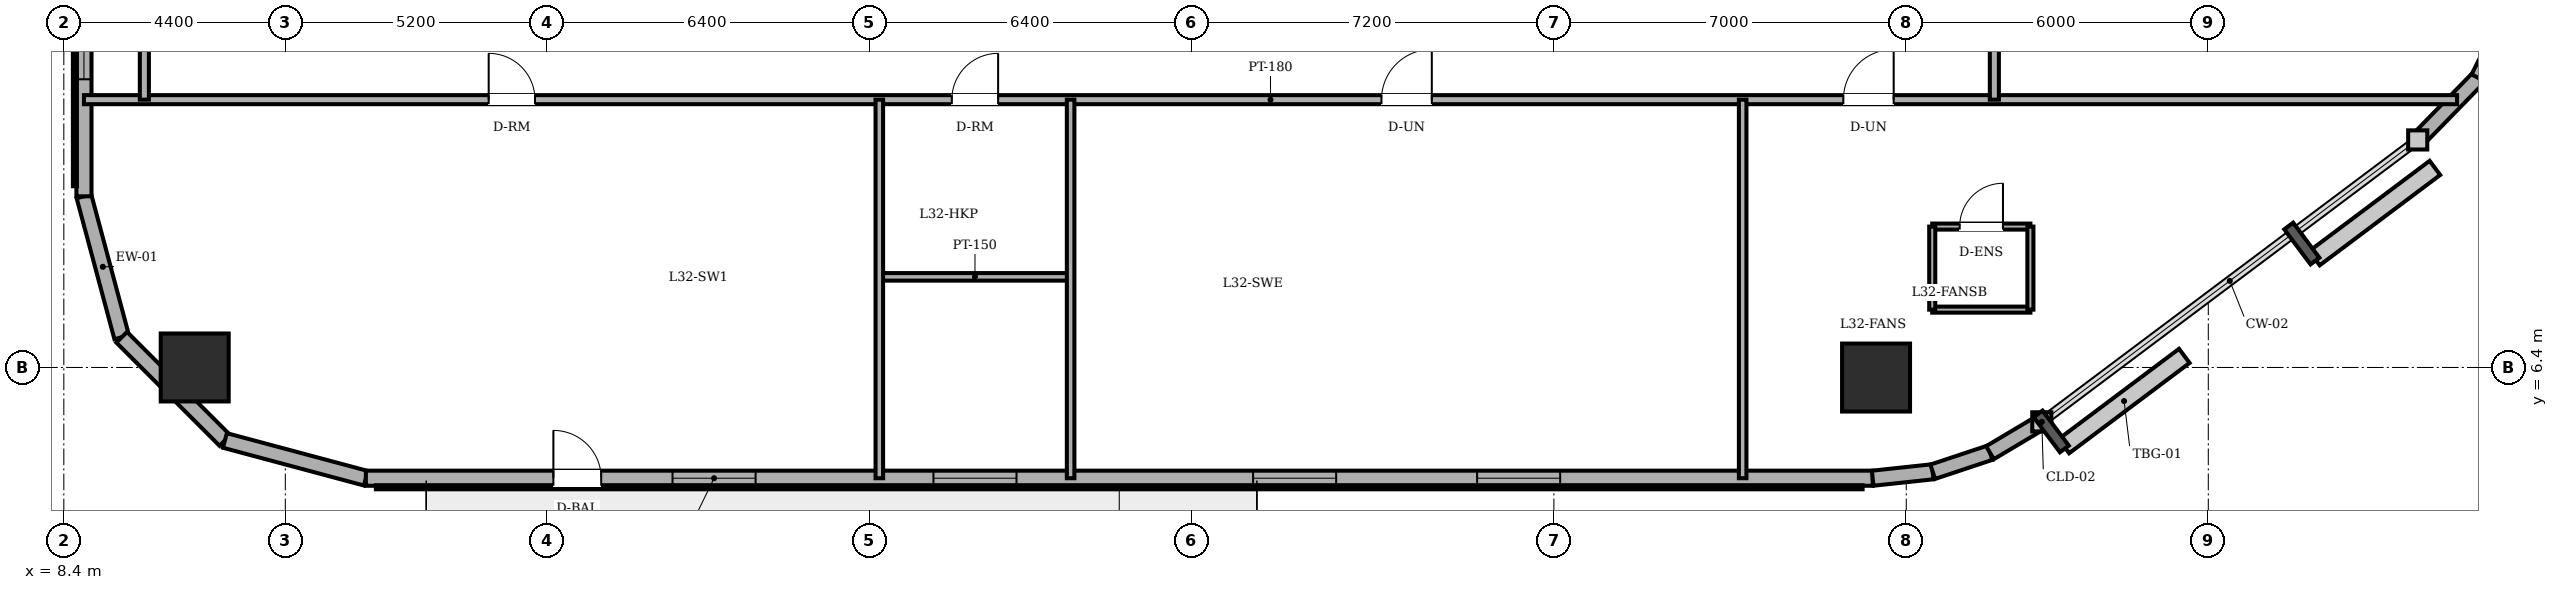
"""IFC4 building model, lengths in metres.
Left out: names, types, materials, properties, quantities, classifications, styles, units other than length and angle.
Written with IfcOpenShell. Run it as: python <this file> out.ifc"""

import sys

from ifc_helpers import new_model, si_unit, direction, frame, frame_2d, origin, origin_2d, place, context, subcontext, project, spatial, rectangle, circle, extrude, element, fill, save


model = new_model("IFC4")
c1 = context("Model", 3, precision=1e-05, world=origin(), true_north=direction((0.0, 1.0)))
c2 = subcontext(c1, "Body", "Model", "MODEL_VIEW")
j1 = project(units=[si_unit("LENGTHUNIT", "METRE"), si_unit("PLANEANGLEUNIT", "RADIAN")], contexts=[c1])
p1 = place(None, origin())
s1 = spatial("IfcSite", under=j1, at=p1, CompositionType="ELEMENT")
p2 = place(p1, origin())
s2 = spatial("IfcBuilding", under=s1, at=p2, CompositionType="ELEMENT")
p3 = place(p2, frame((0.0, 0.0, 122.3)))
s3 = spatial("IfcBuildingStorey", under=s2, at=p3, CompositionType="ELEMENT", Elevation=122.3)
for number, where, z_axis, x_axis in (
    (1, (11.0, 6.4, 0.0), (0.0, 0.0, 1.0), (1.0, 0.0, 0.0)),
    (2, (44.4, 6.2, 0.0), (0.0, 0.0, 1.0), (1.0, 0.0, 0.0)),
):
    element("IfcColumn", number, at=place(p3, frame(where, z_axis=z_axis, x_axis=x_axis)), inside=s3, PredefinedType="COLUMN", context=c2, shape_type="SweptSolid", body=[
        extrude(circle(Radius=0.675, at=origin_2d()), origin(), (0.0, 0.0, 1.0), 3.6),
    ])
p4 = place(p3, frame((8.8, 9.8, 0.0), z_axis=(0.0, 0.0, 1.0), x_axis=(0.258731875344, -0.96594917914, 0.0)))
e3 = element("IfcWall", 3, at=p4, inside=s3, PredefinedType="SOLIDWALL", context=c2, shape_type="SweptSolid", body=[
    extrude(rectangle(XDim=2.899, YDim=0.3, at=frame_2d((1.449, 0.0))), origin(), (0.0, 0.0, 1.0), 3.4),
])
p5 = place(p3, frame((9.55, 7.0, 0.0), z_axis=(0.0, 0.0, 1.0), x_axis=(0.707106781187, -0.707106781187, 0.0)))
e4 = element("IfcWall", 4, at=p5, inside=s3, PredefinedType="SOLIDWALL", context=c2, shape_type="SweptSolid", body=[
    extrude(rectangle(XDim=2.899, YDim=0.3, at=frame_2d((1.45, 0.0))), origin(), (0.0, 0.0, 1.0), 3.4),
])
p6 = place(p3, frame((11.6, 4.95, 0.0), z_axis=(0.0, 0.0, 1.0), x_axis=(0.965943540406, -0.258752926066, 0.0)))
e5 = element("IfcWall", 5, at=p6, inside=s3, PredefinedType="SOLIDWALL", context=c2, shape_type="SweptSolid", body=[
    extrude(rectangle(XDim=2.898, YDim=0.3, at=frame_2d((1.449, 0.0))), origin(), (0.0, 0.0, 1.0), 3.4),
])
p7 = place(p3, frame((14.4, 4.2, 0.0), z_axis=(0.0, 0.0, 1.0), x_axis=(1.0, 0.0, 0.0)))
e6 = element("IfcWall", 6, at=p7, inside=s3, PredefinedType="SOLIDWALL", context=c2, shape_type="SweptSolid", body=[
    extrude(rectangle(XDim=29.933, YDim=0.3, at=frame_2d((14.967, 0.0))), origin(), (0.0, 0.0, 1.0), 3.4),
])
p8 = place(p7, frame((3.725, 0.0, 0.0)))
e7 = element("IfcOpeningElement", 7, at=p8, cuts=e6, PredefinedType="OPENING", context=c2, shape_type="SweptSolid", body=[
    extrude(rectangle(XDim=0.95, YDim=2.2, at=frame_2d((0.475, 1.1))), frame((0.0, 0.16, 0.0), z_axis=(0.0, -1.0, 0.0), x_axis=(1.0, 0.0, 0.0)), (0.0, 0.0, 1.0), 0.32),
])
p9 = place(p7, frame((6.092, 0.0, 0.85)))
e8 = element("IfcOpeningElement", 8, at=p9, cuts=e6, PredefinedType="OPENING", context=c2, shape_type="SweptSolid", body=[
    extrude(rectangle(XDim=1.65, YDim=1.55, at=frame_2d((0.825, 0.775))), frame((0.0, 0.16, 0.0), z_axis=(0.0, -1.0, 0.0), x_axis=(1.0, 0.0, 0.0)), (0.0, 0.0, 1.0), 0.32),
])
p10 = place(p7, frame((11.275, 0.0, 0.85)))
e9 = element("IfcOpeningElement", 9, at=p10, cuts=e6, PredefinedType="OPENING", context=c2, shape_type="SweptSolid", body=[
    extrude(rectangle(XDim=1.65, YDim=1.55, at=frame_2d((0.825, 0.775))), frame((0.0, 0.16, 0.0), z_axis=(0.0, -1.0, 0.0), x_axis=(1.0, 0.0, 0.0)), (0.0, 0.0, 1.0), 0.32),
])
p11 = place(p7, frame((17.625, 0.0, 0.85)))
e10 = element("IfcOpeningElement", 10, at=p11, cuts=e6, PredefinedType="OPENING", context=c2, shape_type="SweptSolid", body=[
    extrude(rectangle(XDim=1.65, YDim=1.55, at=frame_2d((0.825, 0.775))), frame((0.0, 0.16, 0.0), z_axis=(0.0, -1.0, 0.0), x_axis=(1.0, 0.0, 0.0)), (0.0, 0.0, 1.0), 0.32),
])
p12 = place(p7, frame((22.075, 0.0, 0.85)))
e11 = element("IfcOpeningElement", 11, at=p12, cuts=e6, PredefinedType="OPENING", context=c2, shape_type="SweptSolid", body=[
    extrude(rectangle(XDim=1.65, YDim=1.55, at=frame_2d((0.825, 0.775))), frame((0.0, 0.16, 0.0), z_axis=(0.0, -1.0, 0.0), x_axis=(1.0, 0.0, 0.0)), (0.0, 0.0, 1.0), 0.32),
])
p13 = place(p3, frame((44.333, 4.2, 0.0), z_axis=(0.0, 0.0, 1.0), x_axis=(0.994289103787, 0.106720092254, 0.0)))
e12 = element("IfcWall", 12, at=p13, inside=s3, PredefinedType="SOLIDWALL", context=c2, shape_type="SweptSolid", body=[
    extrude(rectangle(XDim=1.199, YDim=0.3, at=frame_2d((0.599, 0.0))), origin(), (0.0, 0.0, 1.0), 3.4),
])
p14 = place(p3, frame((45.525, 4.328, 0.0), z_axis=(0.0, 0.0, 1.0), x_axis=(0.948744332129, 0.316044604847, 0.0)))
e13 = element("IfcWall", 13, at=p14, inside=s3, PredefinedType="SOLIDWALL", context=c2, shape_type="SweptSolid", body=[
    extrude(rectangle(XDim=1.2, YDim=0.3, at=frame_2d((0.6, 0.0))), origin(), (0.0, 0.0, 1.0), 3.4),
])
p15 = place(p3, frame((46.663, 4.707, 0.0), z_axis=(0.0, 0.0, 1.0), x_axis=(0.859320591642, 0.511437308749, 0.0)))
e14 = element("IfcWall", 14, at=p15, inside=s3, PredefinedType="SOLIDWALL", context=c2, shape_type="SweptSolid", body=[
    extrude(rectangle(XDim=1.199, YDim=0.3, at=frame_2d((0.599, 0.0))), origin(), (0.0, 0.0, 1.0), 3.4),
])
for number, where, z_axis, x_axis in (
    (15, (55.16, 10.92, 0.0), (0.0, 0.0, 1.0), (0.698, 0.716, 0.0)),
    (16, (56.364, 12.154, 0.0), (0.0, 0.0, 1.0), (0.447, 0.894, 0.0)),
):
    element("IfcWall", number, at=place(p3, frame(where, z_axis=z_axis, x_axis=x_axis)), inside=s3, PredefinedType="SOLIDWALL", context=c2, shape_type="SweptSolid", body=[
        extrude(rectangle(XDim=1.724, YDim=0.3, at=frame_2d((0.862, 0.0))), origin(), (0.0, 0.0, 1.0), 3.4),
    ])
p16 = place(p3, frame((8.8, 38.2, 0.0), z_axis=(0.0, 0.0, 1.0), x_axis=(0.0, -1.0, 0.0)))
e17 = element("IfcWall", 17, at=p16, inside=s3, PredefinedType="SOLIDWALL", context=c2, shape_type="SweptSolid", body=[
    extrude(rectangle(XDim=28.4, YDim=0.3, at=frame_2d((14.2, 0.0))), origin(), (0.0, 0.0, 1.0), 3.4),
])
p17 = place(p16, frame((2.325, 0.0, 0.85)))
e18 = element("IfcOpeningElement", 18, at=p17, cuts=e17, PredefinedType="OPENING", context=c2, shape_type="SweptSolid", body=[
    extrude(rectangle(XDim=1.65, YDim=1.55, at=frame_2d((0.825, 0.775))), frame((0.0, 0.16, 0.0), z_axis=(0.0, -1.0, 0.0), x_axis=(1.0, 0.0, 0.0)), (0.0, 0.0, 1.0), 0.32),
])
p18 = place(p16, frame((6.828, 0.0, 0.85)))
e19 = element("IfcOpeningElement", 19, at=p18, cuts=e17, PredefinedType="OPENING", context=c2, shape_type="SweptSolid", body=[
    extrude(rectangle(XDim=1.65, YDim=1.55, at=frame_2d((0.825, 0.775))), frame((0.0, 0.16, 0.0), z_axis=(0.0, -1.0, 0.0), x_axis=(1.0, 0.0, 0.0)), (0.0, 0.0, 1.0), 0.32),
])
p19 = place(p16, frame((10.102, 0.0, 0.85)))
e20 = element("IfcOpeningElement", 20, at=p19, cuts=e17, PredefinedType="OPENING", context=c2, shape_type="SweptSolid", body=[
    extrude(rectangle(XDim=1.65, YDim=1.55, at=frame_2d((0.825, 0.775))), frame((0.0, 0.16, 0.0), z_axis=(0.0, -1.0, 0.0), x_axis=(1.0, 0.0, 0.0)), (0.0, 0.0, 1.0), 0.32),
])
p20 = place(p16, frame((16.648, 0.0, 0.85)))
e21 = element("IfcOpeningElement", 21, at=p20, cuts=e17, PredefinedType="OPENING", context=c2, shape_type="SweptSolid", body=[
    extrude(rectangle(XDim=1.65, YDim=1.55, at=frame_2d((0.825, 0.775))), frame((0.0, 0.16, 0.0), z_axis=(0.0, -1.0, 0.0), x_axis=(1.0, 0.0, 0.0)), (0.0, 0.0, 1.0), 0.32),
])
p21 = place(p16, frame((19.922, 0.0, 0.85)))
e22 = element("IfcOpeningElement", 22, at=p21, cuts=e17, PredefinedType="OPENING", context=c2, shape_type="SweptSolid", body=[
    extrude(rectangle(XDim=1.65, YDim=1.55, at=frame_2d((0.825, 0.775))), frame((0.0, 0.16, 0.0), z_axis=(0.0, -1.0, 0.0), x_axis=(1.0, 0.0, 0.0)), (0.0, 0.0, 1.0), 0.32),
])
p22 = place(p16, frame((24.425, 0.0, 0.85)))
e23 = element("IfcOpeningElement", 23, at=p22, cuts=e17, PredefinedType="OPENING", context=c2, shape_type="SweptSolid", body=[
    extrude(rectangle(XDim=1.65, YDim=1.55, at=frame_2d((0.825, 0.775))), frame((0.0, 0.16, 0.0), z_axis=(0.0, -1.0, 0.0), x_axis=(1.0, 0.0, 0.0)), (0.0, 0.0, 1.0), 0.32),
])
p23 = place(p3, frame((45.516, 9.199, 0.0), z_axis=(0.0, 0.0, 1.0), x_axis=(1.0, 0.0, 0.0)))
e24 = element("IfcWall", 24, at=p23, inside=s3, PredefinedType="PARTITIONING", context=c2, shape_type="SweptSolid", body=[
    extrude(rectangle(XDim=1.95, YDim=0.12, at=frame_2d((0.975, 0.0))), origin(), (0.0, 0.0, 1.0), 3.4),
])
p24 = place(p23, frame((0.545, 0.0, 0.0)))
e25 = element("IfcOpeningElement", 25, at=p24, cuts=e24, PredefinedType="OPENING", context=c2, shape_type="SweptSolid", body=[
    extrude(rectangle(XDim=0.86, YDim=2.1, at=frame_2d((0.43, 1.05))), frame((0.0, 0.07, 0.0), z_axis=(0.0, -1.0, 0.0), x_axis=(1.0, 0.0, 0.0)), (0.0, 0.0, 1.0), 0.14),
])
p25 = place(p3, frame((47.466, 7.549, 0.0), z_axis=(0.0, 0.0, 1.0), x_axis=(-1.0, 0.0, 0.0)))
e26 = element("IfcWall", 26, at=p25, inside=s3, PredefinedType="PARTITIONING", context=c2, shape_type="SweptSolid", body=[
    extrude(rectangle(XDim=1.95, YDim=0.12, at=frame_2d((0.975, 0.0))), origin(), (0.0, 0.0, 1.0), 3.4),
])
for number, where, z_axis, x_axis in (
    (27, (45.516, 9.199, 0.0), (0.0, 0.0, 1.0), (0.0, -1.0, 0.0)),
    (28, (47.466, 7.549, 0.0), (0.0, 0.0, 1.0), (0.0, 1.0, 0.0)),
):
    element("IfcWall", number, at=place(p3, frame(where, z_axis=z_axis, x_axis=x_axis)), inside=s3, PredefinedType="PARTITIONING", context=c2, shape_type="SweptSolid", body=[
        extrude(rectangle(XDim=1.65, YDim=0.12, at=frame_2d((0.825, 0.0))), origin(), (0.0, 0.0, 1.0), 3.4),
    ])
p26 = place(p3, frame((24.6, 8.2, 0.0), z_axis=(0.0, 0.0, 1.0), x_axis=(1.0, 0.0, 0.0)))
e29 = element("IfcWall", 29, at=p26, inside=s3, PredefinedType="PARTITIONING", context=c2, shape_type="SweptSolid", body=[
    extrude(rectangle(XDim=3.8, YDim=0.15, at=frame_2d((1.9, 0.0))), origin(), (0.0, 0.0, 1.0), 3.4),
])
p27 = place(p3, frame((8.8, 11.72, 0.0), z_axis=(0.0, 0.0, 1.0), x_axis=(1.0, 0.0, 0.0)))
e30 = element("IfcWall", 30, at=p27, inside=s3, PredefinedType="PARTITIONING", context=c2, shape_type="SweptSolid", body=[
    extrude(rectangle(XDim=47.141, YDim=0.18, at=frame_2d((23.57, 0.0))), origin(), (0.0, 0.0, 1.0), 3.4),
])
p28 = place(p27, frame((17.24, 0.0, 0.0)))
e31 = element("IfcOpeningElement", 31, at=p28, cuts=e30, PredefinedType="OPENING", context=c2, shape_type="SweptSolid", body=[
    extrude(rectangle(XDim=0.92, YDim=2.1, at=frame_2d((0.46, 1.05))), frame((0.0, 0.1, 0.0), z_axis=(0.0, -1.0, 0.0), x_axis=(1.0, 0.0, 0.0)), (0.0, 0.0, 1.0), 0.2),
])
p29 = place(p27, frame((34.95, 0.0, 0.0)))
e32 = element("IfcOpeningElement", 32, at=p29, cuts=e30, PredefinedType="OPENING", context=c2, shape_type="SweptSolid", body=[
    extrude(rectangle(XDim=1.0, YDim=2.15, at=frame_2d((0.5, 1.075))), frame((0.0, 0.1, 0.0), z_axis=(0.0, -1.0, 0.0), x_axis=(1.0, 0.0, 0.0)), (0.0, 0.0, 1.0), 0.2),
])
p30 = place(p27, frame((8.04, 0.0, 0.0)))
e33 = element("IfcOpeningElement", 33, at=p30, cuts=e30, PredefinedType="OPENING", context=c2, shape_type="SweptSolid", body=[
    extrude(rectangle(XDim=0.92, YDim=2.1, at=frame_2d((0.46, 1.05))), frame((0.0, 0.1, 0.0), z_axis=(0.0, -1.0, 0.0), x_axis=(1.0, 0.0, 0.0)), (0.0, 0.0, 1.0), 0.2),
])
p31 = place(p27, frame((25.775, 0.0, 0.0)))
e34 = element("IfcOpeningElement", 34, at=p31, cuts=e30, PredefinedType="OPENING", context=c2, shape_type="SweptSolid", body=[
    extrude(rectangle(XDim=1.0, YDim=2.15, at=frame_2d((0.5, 1.075))), frame((0.0, 0.1, 0.0), z_axis=(0.0, -1.0, 0.0), x_axis=(1.0, 0.0, 0.0)), (0.0, 0.0, 1.0), 0.2),
])
p32 = place(p3, frame((10.0, 11.72, 0.0), z_axis=(0.0, 0.0, 1.0), x_axis=(0.0, 1.0, 0.0)))
e35 = element("IfcWall", 35, at=p32, inside=s3, PredefinedType="PARTITIONING", context=c2, shape_type="SweptSolid", body=[
    extrude(rectangle(XDim=2.46, YDim=0.18, at=frame_2d((1.23, 0.0))), origin(), (0.0, 0.0, 1.0), 3.4),
])
for number, where, z_axis, x_axis in (
    (36, (24.6, 4.2, 0.0), (0.0, 0.0, 1.0), (0.0, 1.0, 0.0)),
    (37, (28.4, 4.2, 0.0), (0.0, 0.0, 1.0), (0.0, 1.0, 0.0)),
    (38, (41.75, 4.2, 0.0), (0.0, 0.0, 1.0), (0.0, 1.0, 0.0)),
):
    element("IfcWall", number, at=place(p3, frame(where, z_axis=z_axis, x_axis=x_axis)), inside=s3, PredefinedType="PARTITIONING", context=c2, shape_type="SweptSolid", body=[
        extrude(rectangle(XDim=7.52, YDim=0.15, at=frame_2d((3.76, 0.0))), origin(), (0.0, 0.0, 1.0), 3.4),
    ])
p33 = place(p3, frame((46.75, 11.72, 0.0), z_axis=(0.0, 0.0, 1.0), x_axis=(0.0, 1.0, 0.0)))
e39 = element("IfcWall", 39, at=p33, inside=s3, PredefinedType="PARTITIONING", context=c2, shape_type="SweptSolid", body=[
    extrude(rectangle(XDim=2.46, YDim=0.18, at=frame_2d((1.23, 0.0))), origin(), (0.0, 0.0, 1.0), 2.882),
])
p34 = place(p8, origin())
e40 = element("IfcDoor", 40, at=p34, inside=s3, OperationType="SINGLE_SWING_LEFT", PredefinedType="DOOR", context=c2, shape_type="SweptSolid", body=[
    extrude(rectangle(XDim=0.95, YDim=2.2, at=frame_2d((0.475, 1.1))), frame((0.0, 0.025, 0.0), z_axis=(0.0, -1.0, 0.0), x_axis=(1.0, 0.0, 0.0)), (0.0, 0.0, 1.0), 0.05),
])
fill(e7, e40)
p35 = place(p9, origin())
e41 = element("IfcWindow", 41, at=p35, inside=s3, PartitioningType="DOUBLE_PANEL_VERTICAL", PredefinedType="WINDOW", context=c2, shape_type="SweptSolid", body=[
    extrude(rectangle(XDim=1.65, YDim=1.55, at=frame_2d((0.825, 0.775))), frame((0.0, 0.03, 0.0), z_axis=(0.0, -1.0, 0.0), x_axis=(1.0, 0.0, 0.0)), (0.0, 0.0, 1.0), 0.06),
])
fill(e8, e41)
p36 = place(p10, origin())
e42 = element("IfcWindow", 42, at=p36, inside=s3, PartitioningType="DOUBLE_PANEL_VERTICAL", PredefinedType="WINDOW", context=c2, shape_type="SweptSolid", body=[
    extrude(rectangle(XDim=1.65, YDim=1.55, at=frame_2d((0.825, 0.775))), frame((0.0, 0.03, 0.0), z_axis=(0.0, -1.0, 0.0), x_axis=(1.0, 0.0, 0.0)), (0.0, 0.0, 1.0), 0.06),
])
fill(e9, e42)
p37 = place(p11, origin())
e43 = element("IfcWindow", 43, at=p37, inside=s3, PartitioningType="DOUBLE_PANEL_VERTICAL", PredefinedType="WINDOW", context=c2, shape_type="SweptSolid", body=[
    extrude(rectangle(XDim=1.65, YDim=1.55, at=frame_2d((0.825, 0.775))), frame((0.0, 0.03, 0.0), z_axis=(0.0, -1.0, 0.0), x_axis=(1.0, 0.0, 0.0)), (0.0, 0.0, 1.0), 0.06),
])
fill(e10, e43)
p38 = place(p12, origin())
e44 = element("IfcWindow", 44, at=p38, inside=s3, PartitioningType="DOUBLE_PANEL_VERTICAL", PredefinedType="WINDOW", context=c2, shape_type="SweptSolid", body=[
    extrude(rectangle(XDim=1.65, YDim=1.55, at=frame_2d((0.825, 0.775))), frame((0.0, 0.03, 0.0), z_axis=(0.0, -1.0, 0.0), x_axis=(1.0, 0.0, 0.0)), (0.0, 0.0, 1.0), 0.06),
])
fill(e11, e44)
p39 = place(p22, origin())
e45 = element("IfcWindow", 45, at=p39, inside=s3, PartitioningType="DOUBLE_PANEL_VERTICAL", PredefinedType="WINDOW", context=c2, shape_type="SweptSolid", body=[
    extrude(rectangle(XDim=1.65, YDim=1.55, at=frame_2d((0.825, 0.775))), frame((0.0, 0.03, 0.0), z_axis=(0.0, -1.0, 0.0), x_axis=(1.0, 0.0, 0.0)), (0.0, 0.0, 1.0), 0.06),
])
fill(e23, e45)
p40 = place(p24, origin())
e46 = element("IfcDoor", 46, at=p40, inside=s3, OperationType="SINGLE_SWING_RIGHT", PredefinedType="DOOR", context=c2, shape_type="SweptSolid", body=[
    extrude(rectangle(XDim=0.86, YDim=2.1, at=frame_2d((0.43, 1.05))), frame((0.0, 0.025, 0.0), z_axis=(0.0, -1.0, 0.0), x_axis=(1.0, 0.0, 0.0)), (0.0, 0.0, 1.0), 0.05),
])
fill(e25, e46)
p41 = place(p28, origin())
e47 = element("IfcDoor", 47, at=p41, inside=s3, OperationType="SINGLE_SWING_RIGHT", PredefinedType="DOOR", context=c2, shape_type="SweptSolid", body=[
    extrude(rectangle(XDim=0.92, YDim=2.1, at=frame_2d((0.46, 1.05))), frame((0.0, 0.025, 0.0), z_axis=(0.0, -1.0, 0.0), x_axis=(1.0, 0.0, 0.0)), (0.0, 0.0, 1.0), 0.05),
])
fill(e31, e47)
p42 = place(p29, origin())
e48 = element("IfcDoor", 48, at=p42, inside=s3, OperationType="SINGLE_SWING_RIGHT", PredefinedType="DOOR", context=c2, shape_type="SweptSolid", body=[
    extrude(rectangle(XDim=1.0, YDim=2.15, at=frame_2d((0.5, 1.075))), frame((0.0, 0.025, 0.0), z_axis=(0.0, -1.0, 0.0), x_axis=(1.0, 0.0, 0.0)), (0.0, 0.0, 1.0), 0.05),
])
fill(e32, e48)
p43 = place(p30, origin())
e49 = element("IfcDoor", 49, at=p43, inside=s3, OperationType="SINGLE_SWING_LEFT", PredefinedType="DOOR", context=c2, shape_type="SweptSolid", body=[
    extrude(rectangle(XDim=0.92, YDim=2.1, at=frame_2d((0.46, 1.05))), frame((0.0, 0.025, 0.0), z_axis=(0.0, -1.0, 0.0), x_axis=(1.0, 0.0, 0.0)), (0.0, 0.0, 1.0), 0.05),
])
fill(e33, e49)
p44 = place(p31, origin())
e50 = element("IfcDoor", 50, at=p44, inside=s3, OperationType="SINGLE_SWING_RIGHT", PredefinedType="DOOR", context=c2, shape_type="SweptSolid", body=[
    extrude(rectangle(XDim=1.0, YDim=2.15, at=frame_2d((0.5, 1.075))), frame((0.0, 0.025, 0.0), z_axis=(0.0, -1.0, 0.0), x_axis=(1.0, 0.0, 0.0)), (0.0, 0.0, 1.0), 0.05),
])
fill(e34, e50)
save(model, sys.argv[1])
